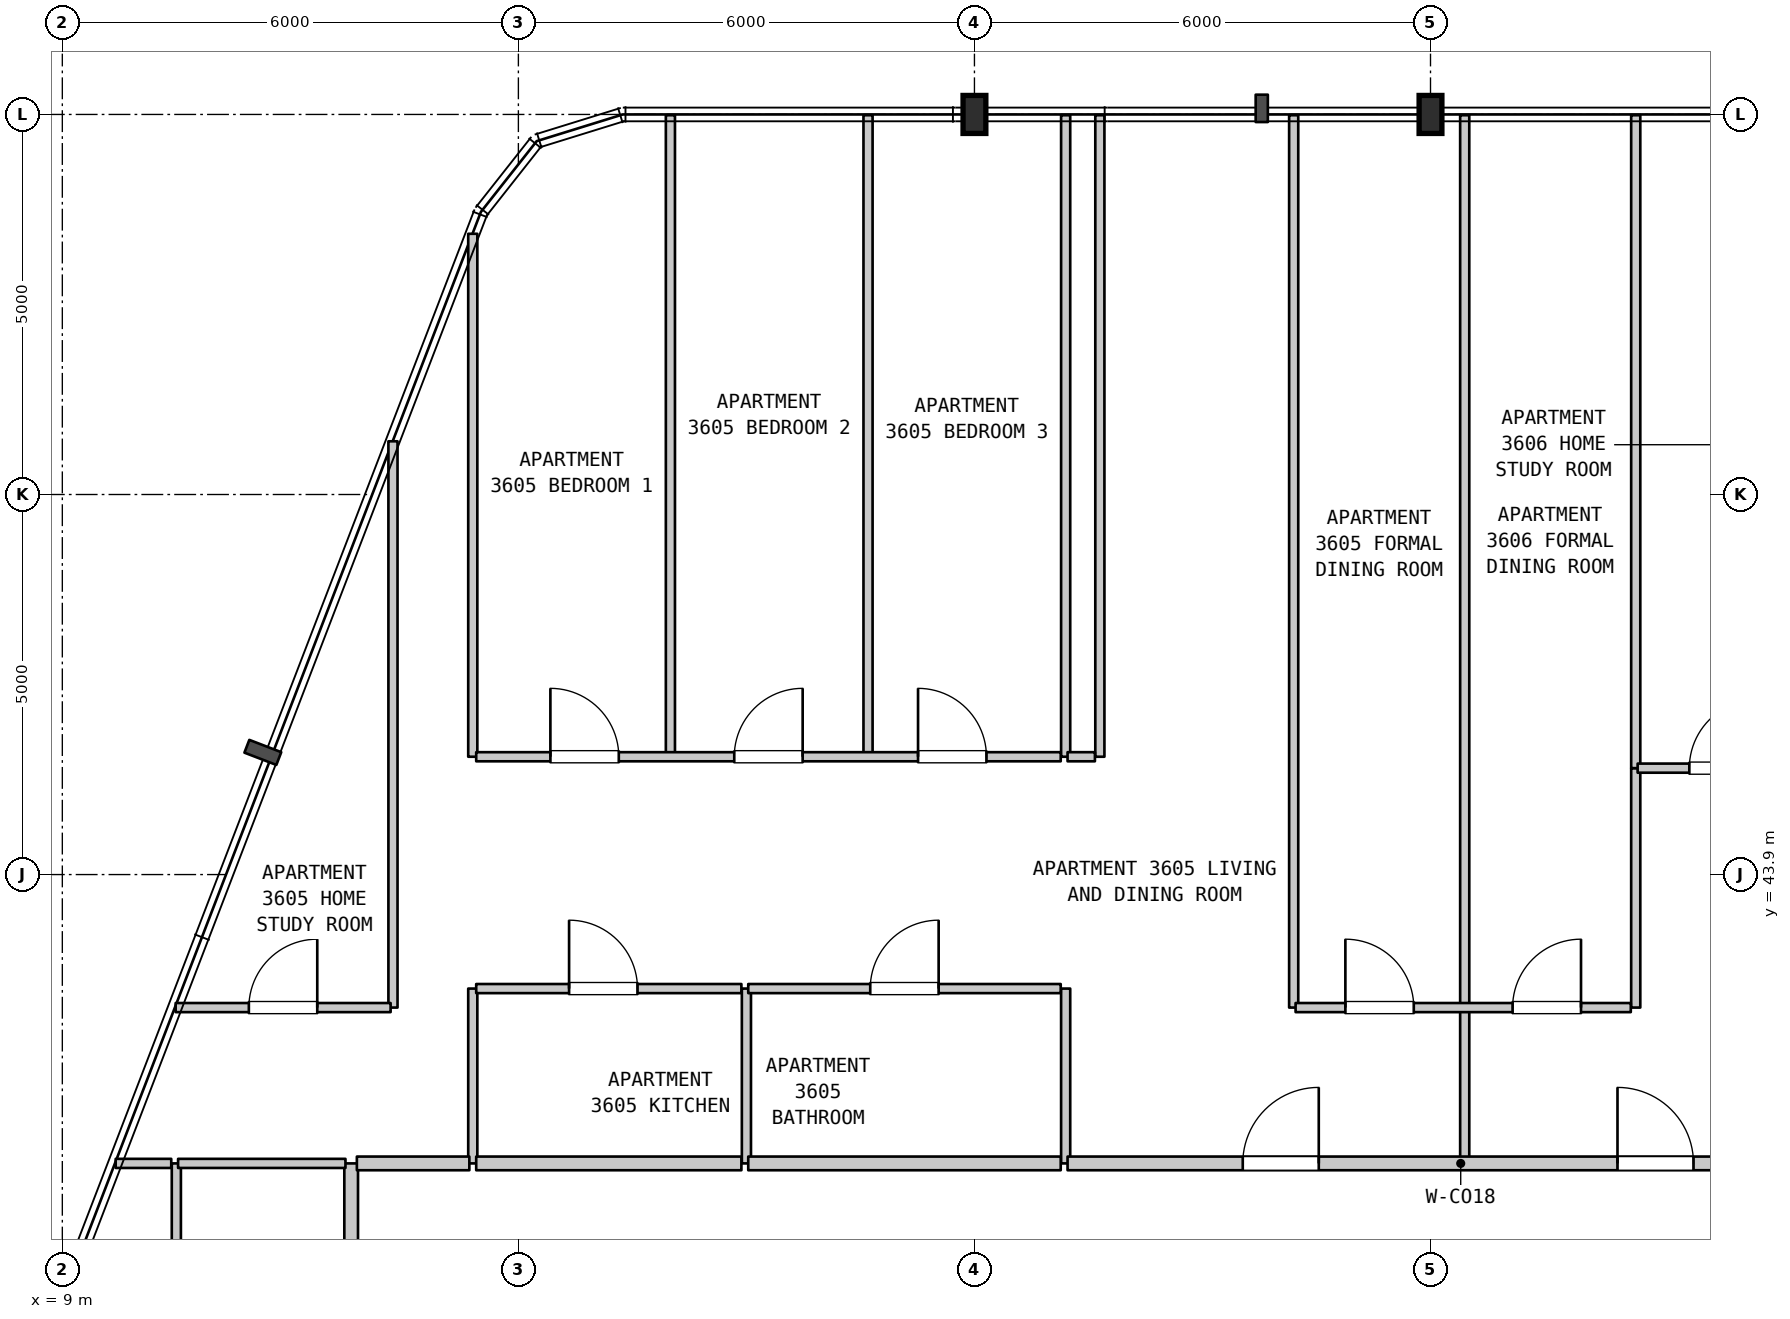
"""IFC4 building model, lengths in metres.
Left out: names, types, materials, properties, quantities, classifications, styles, units other than length and angle.
Written with IfcOpenShell. Run it as: python <this file> out.ifc"""

import sys

from ifc_helpers import new_model, si_unit, direction, frame, frame_2d, origin, origin_2d, place, context, subcontext, project, spatial, rectangle, i_section, extrude, element, fill, save


model = new_model("IFC4")
c1 = context("Model", 3, precision=1e-05, world=origin(), true_north=direction((0.0, 1.0)))
c2 = subcontext(c1, "Body", "Model", "MODEL_VIEW")
j1 = project(units=[si_unit("LENGTHUNIT", "METRE"), si_unit("PLANEANGLEUNIT", "RADIAN")], contexts=[c1])
p1 = place(None, origin())
s1 = spatial("IfcSite", under=j1, at=p1, CompositionType="ELEMENT")
p2 = place(p1, origin())
s2 = spatial("IfcBuilding", under=s1, at=p2, CompositionType="ELEMENT")
p3 = place(p2, frame((0.0, 0.0, 148.3)))
s3 = spatial("IfcBuildingStorey", under=s2, at=p3, CompositionType="ELEMENT", Elevation=148.3)
for number, where, z_axis, x_axis in (
    (1, (21.0, 53.9, 0.0), (0.0, 0.0, 1.0), (1.0, 0.0, 0.0)),
    (2, (27.0, 53.9, 0.0), (0.0, 0.0, 1.0), (1.0, 0.0, 0.0)),
):
    element("IfcColumn", number, at=place(p3, frame(where, z_axis=z_axis, x_axis=x_axis)), inside=s3, PredefinedType="COLUMN", context=c2, shape_type="SweptSolid", body=[
        extrude(i_section(OverallWidth=0.3, OverallDepth=0.5, WebThickness=0.014, FlangeThickness=0.028, FilletRadius=0.027, at=origin_2d()), origin(), (0.0, 0.0, 1.0), 3.7),
    ])
p4 = place(p3, frame((10.5, 31.09, 0.0), z_axis=(0.0, 0.0, 1.0), x_axis=(0.0, 1.0, 0.0)))
e3 = element("IfcWall", 3, at=p4, inside=s3, PredefinedType="PARTITIONING", context=c2, shape_type="SweptSolid", body=[
    extrude(rectangle(XDim=9.01, YDim=0.12, at=frame_2d((4.505, 0.0))), origin(), (0.0, 0.0, 1.0), 3.385),
])
p5 = place(p3, frame((12.8, 31.09, 0.0), z_axis=(0.0, 0.0, 1.0), x_axis=(0.0, 1.0, 0.0)))
e4 = element("IfcWall", 4, at=p5, inside=s3, PredefinedType="STANDARD", context=c2, shape_type="SweptSolid", body=[
    extrude(rectangle(XDim=9.01, YDim=0.18, at=frame_2d((4.505, 0.0))), origin(), (0.0, 0.0, 1.0), 3.385),
])
p6 = place(p3, frame((13.35, 42.15, 0.0), z_axis=(0.0, 0.0, 1.0), x_axis=(0.0, 1.0, 0.0)))
e5 = element("IfcWall", 5, at=p6, inside=s3, PredefinedType="PARTITIONING", context=c2, shape_type="SweptSolid", body=[
    extrude(rectangle(XDim=7.45, YDim=0.12, at=frame_2d((3.725, 0.0))), origin(), (0.0, 0.0, 1.0), 3.385),
])
p7 = place(p3, frame((14.4, 40.1, 0.0), z_axis=(0.0, 0.0, 1.0), x_axis=(0.0, 1.0, 0.0)))
e6 = element("IfcWall", 6, at=p7, inside=s3, PredefinedType="PARTITIONING", context=c2, shape_type="SweptSolid", body=[
    extrude(rectangle(XDim=2.3, YDim=0.12, at=frame_2d((1.15, 0.0))), origin(), (0.0, 0.0, 1.0), 3.385),
])
p8 = place(p3, frame((14.4, 45.45, 0.0), z_axis=(0.0, 0.0, 1.0), x_axis=(0.0, 1.0, 0.0)))
e7 = element("IfcWall", 7, at=p8, inside=s3, PredefinedType="PARTITIONING", context=c2, shape_type="SweptSolid", body=[
    extrude(rectangle(XDim=6.88, YDim=0.12, at=frame_2d((3.44, 0.0))), origin(), (0.0, 0.0, 1.0), 3.385),
])
p9 = place(p3, frame((17.0, 45.45, 0.0), z_axis=(0.0, 0.0, 1.0), x_axis=(0.0, 1.0, 0.0)))
e8 = element("IfcWall", 8, at=p9, inside=s3, PredefinedType="PARTITIONING", context=c2, shape_type="SweptSolid", body=[
    extrude(rectangle(XDim=8.44, YDim=0.12, at=frame_2d((4.22, 0.0))), origin(), (0.0, 0.0, 1.0), 3.385),
])
p10 = place(p3, frame((18.0, 40.1, 0.0), z_axis=(0.0, 0.0, 1.0), x_axis=(0.0, 1.0, 0.0)))
e9 = element("IfcWall", 9, at=p10, inside=s3, PredefinedType="PARTITIONING", context=c2, shape_type="SweptSolid", body=[
    extrude(rectangle(XDim=2.3, YDim=0.12, at=frame_2d((1.15, 0.0))), origin(), (0.0, 0.0, 1.0), 3.385),
])
p11 = place(p3, frame((19.6, 45.45, 0.0), z_axis=(0.0, 0.0, 1.0), x_axis=(0.0, 1.0, 0.0)))
e10 = element("IfcWall", 10, at=p11, inside=s3, PredefinedType="PARTITIONING", context=c2, shape_type="SweptSolid", body=[
    extrude(rectangle(XDim=8.44, YDim=0.12, at=frame_2d((4.22, 0.0))), origin(), (0.0, 0.0, 1.0), 3.385),
])
p12 = place(p3, frame((22.2, 40.1, 0.0), z_axis=(0.0, 0.0, 1.0), x_axis=(0.0, 1.0, 0.0)))
e11 = element("IfcWall", 11, at=p12, inside=s3, PredefinedType="PARTITIONING", context=c2, shape_type="SweptSolid", body=[
    extrude(rectangle(XDim=2.3, YDim=0.12, at=frame_2d((1.15, 0.0))), origin(), (0.0, 0.0, 1.0), 3.385),
])
for number, where, z_axis, x_axis in (
    (12, (22.2, 45.45, 0.0), (0.0, 0.0, 1.0), (0.0, 1.0, 0.0)),
    (13, (22.65, 45.45, 0.0), (0.0, 0.0, 1.0), (0.0, 1.0, 0.0)),
):
    element("IfcWall", number, at=place(p3, frame(where, z_axis=z_axis, x_axis=x_axis)), inside=s3, PredefinedType="PARTITIONING", context=c2, shape_type="SweptSolid", body=[
        extrude(rectangle(XDim=8.44, YDim=0.12, at=frame_2d((4.22, 0.0))), origin(), (0.0, 0.0, 1.0), 3.385),
    ])
p13 = place(p3, frame((25.2, 42.15, 0.0), z_axis=(0.0, 0.0, 1.0), x_axis=(0.0, 1.0, 0.0)))
e14 = element("IfcWall", 14, at=p13, inside=s3, PredefinedType="PARTITIONING", context=c2, shape_type="SweptSolid", body=[
    extrude(rectangle(XDim=11.74, YDim=0.12, at=frame_2d((5.87, 0.0))), origin(), (0.0, 0.0, 1.0), 3.385),
])
p14 = place(p3, frame((27.45, 40.1, 0.0), z_axis=(0.0, 0.0, 1.0), x_axis=(0.0, 1.0, 0.0)))
e15 = element("IfcWall", 15, at=p14, inside=s3, PredefinedType="PARTITIONING", context=c2, shape_type="SweptSolid", body=[
    extrude(rectangle(XDim=2.05, YDim=0.12, at=frame_2d((1.025, 0.0))), origin(), (0.0, 0.0, 1.0), 3.385),
])
p15 = place(p3, frame((27.45, 42.15, 0.0), z_axis=(0.0, 0.0, 1.0), x_axis=(0.0, 1.0, 0.0)))
e16 = element("IfcWall", 16, at=p15, inside=s3, PredefinedType="PARTITIONING", context=c2, shape_type="SweptSolid", body=[
    extrude(rectangle(XDim=11.74, YDim=0.12, at=frame_2d((5.87, 0.0))), origin(), (0.0, 0.0, 1.0), 3.385),
])
p16 = place(p3, frame((29.7, 42.15, 0.0), z_axis=(0.0, 0.0, 1.0), x_axis=(0.0, 1.0, 0.0)))
e17 = element("IfcWall", 17, at=p16, inside=s3, PredefinedType="PARTITIONING", context=c2, shape_type="SweptSolid", body=[
    extrude(rectangle(XDim=3.15, YDim=0.12, at=frame_2d((1.575, 0.0))), origin(), (0.0, 0.0, 1.0), 3.385),
])
p17 = place(p3, frame((29.7, 45.3, 0.0), z_axis=(0.0, 0.0, 1.0), x_axis=(0.0, 1.0, 0.0)))
e18 = element("IfcWall", 18, at=p17, inside=s3, PredefinedType="PARTITIONING", context=c2, shape_type="SweptSolid", body=[
    extrude(rectangle(XDim=8.59, YDim=0.12, at=frame_2d((4.295, 0.0))), origin(), (0.0, 0.0, 1.0), 3.385),
])
p18 = place(p3, frame((9.702, 40.1, 0.0), z_axis=(0.0, 0.0, 1.0), x_axis=(1.0, 0.0, 0.0)))
e19 = element("IfcWall", 19, at=p18, inside=s3, PredefinedType="PARTITIONING", context=c2, shape_type="SweptSolid", body=[
    extrude(rectangle(XDim=0.731, YDim=0.12, at=frame_2d((0.366, 0.0))), origin(), (0.0, 0.0, 1.0), 3.385),
])
p19 = place(p3, frame((10.523, 40.1, 0.0), z_axis=(0.0, 0.0, 1.0), x_axis=(1.0, 0.0, 0.0)))
e20 = element("IfcWall", 20, at=p19, inside=s3, PredefinedType="PARTITIONING", context=c2, shape_type="SweptSolid", body=[
    extrude(rectangle(XDim=2.202, YDim=0.12, at=frame_2d((1.101, 0.0))), origin(), (0.0, 0.0, 1.0), 3.385),
])
p20 = place(p3, frame((12.875, 40.1, 0.0), z_axis=(0.0, 0.0, 1.0), x_axis=(1.0, 0.0, 0.0)))
e21 = element("IfcWall", 21, at=p20, inside=s3, PredefinedType="STANDARD", context=c2, shape_type="SweptSolid", body=[
    extrude(rectangle(XDim=1.48, YDim=0.18, at=frame_2d((0.74, 0.0))), origin(), (0.0, 0.0, 1.0), 3.385),
])
p21 = place(p3, frame((14.445, 40.1, 0.0), z_axis=(0.0, 0.0, 1.0), x_axis=(1.0, 0.0, 0.0)))
e22 = element("IfcWall", 22, at=p21, inside=s3, PredefinedType="STANDARD", context=c2, shape_type="SweptSolid", body=[
    extrude(rectangle(XDim=3.489, YDim=0.18, at=frame_2d((1.745, 0.0))), origin(), (0.0, 0.0, 1.0), 3.385),
])
p22 = place(p3, frame((18.024, 40.1, 0.0), z_axis=(0.0, 0.0, 1.0), x_axis=(1.0, 0.0, 0.0)))
e23 = element("IfcWall", 23, at=p22, inside=s3, PredefinedType="STANDARD", context=c2, shape_type="SweptSolid", body=[
    extrude(rectangle(XDim=4.111, YDim=0.18, at=frame_2d((2.056, 0.0))), origin(), (0.0, 0.0, 1.0), 3.385),
])
p23 = place(p3, frame((22.225, 40.1, 0.0), z_axis=(0.0, 0.0, 1.0), x_axis=(1.0, 0.0, 0.0)))
e24 = element("IfcWall", 24, at=p23, inside=s3, PredefinedType="STANDARD", context=c2, shape_type="SweptSolid", body=[
    extrude(rectangle(XDim=10.345, YDim=0.18, at=frame_2d((5.172, 0.0))), origin(), (0.0, 0.0, 1.0), 3.385),
])
p24 = place(p23, frame((2.305, 0.0, 0.0)))
e25 = element("IfcOpeningElement", 25, at=p24, cuts=e24, PredefinedType="OPENING", context=c2, shape_type="SweptSolid", body=[
    extrude(rectangle(XDim=1.0, YDim=2.15, at=frame_2d((0.5, 1.075))), frame((0.0, 0.1, 0.0), z_axis=(0.0, -1.0, 0.0), x_axis=(1.0, 0.0, 0.0)), (0.0, 0.0, 1.0), 0.2),
])
p25 = place(p23, frame((7.235, 0.0, 0.0)))
e26 = element("IfcOpeningElement", 26, at=p25, cuts=e24, PredefinedType="OPENING", context=c2, shape_type="SweptSolid", body=[
    extrude(rectangle(XDim=1.0, YDim=2.15, at=frame_2d((0.5, 1.075))), frame((0.0, 0.1, 0.0), z_axis=(0.0, -1.0, 0.0), x_axis=(1.0, 0.0, 0.0)), (0.0, 0.0, 1.0), 0.2),
])
p26 = place(p3, frame((10.491, 42.15, 0.0), z_axis=(0.0, 0.0, 1.0), x_axis=(1.0, 0.0, 0.0)))
e27 = element("IfcWall", 27, at=p26, inside=s3, PredefinedType="PARTITIONING", context=c2, shape_type="SweptSolid", body=[
    extrude(rectangle(XDim=2.828, YDim=0.12, at=frame_2d((1.414, 0.0))), origin(), (0.0, 0.0, 1.0), 3.385),
])
p27 = place(p26, frame((0.963, 0.0, 0.0)))
e28 = element("IfcOpeningElement", 28, at=p27, cuts=e27, PredefinedType="OPENING", context=c2, shape_type="SweptSolid", body=[
    extrude(rectangle(XDim=0.9, YDim=2.15, at=frame_2d((0.45, 1.075))), frame((0.0, 0.07, 0.0), z_axis=(0.0, -1.0, 0.0), x_axis=(1.0, 0.0, 0.0)), (0.0, 0.0, 1.0), 0.14),
])
p28 = place(p3, frame((25.225, 42.15, 0.0), z_axis=(0.0, 0.0, 1.0), x_axis=(1.0, 0.0, 0.0)))
e29 = element("IfcWall", 29, at=p28, inside=s3, PredefinedType="PARTITIONING", context=c2, shape_type="SweptSolid", body=[
    extrude(rectangle(XDim=4.41, YDim=0.12, at=frame_2d((2.205, 0.0))), origin(), (0.0, 0.0, 1.0), 3.385),
])
p29 = place(p28, frame((0.655, 0.0, 0.0)))
e30 = element("IfcOpeningElement", 30, at=p29, cuts=e29, PredefinedType="OPENING", context=c2, shape_type="SweptSolid", body=[
    extrude(rectangle(XDim=0.9, YDim=2.15, at=frame_2d((0.45, 1.075))), frame((0.0, 0.07, 0.0), z_axis=(0.0, -1.0, 0.0), x_axis=(1.0, 0.0, 0.0)), (0.0, 0.0, 1.0), 0.14),
])
p30 = place(p28, frame((2.855, 0.0, 0.0)))
e31 = element("IfcOpeningElement", 31, at=p30, cuts=e29, PredefinedType="OPENING", context=c2, shape_type="SweptSolid", body=[
    extrude(rectangle(XDim=0.9, YDim=2.15, at=frame_2d((0.45, 1.075))), frame((0.0, 0.07, 0.0), z_axis=(0.0, -1.0, 0.0), x_axis=(1.0, 0.0, 0.0)), (0.0, 0.0, 1.0), 0.14),
])
p31 = place(p3, frame((14.445, 42.4, 0.0), z_axis=(0.0, 0.0, 1.0), x_axis=(1.0, 0.0, 0.0)))
e32 = element("IfcWall", 32, at=p31, inside=s3, PredefinedType="PARTITIONING", context=c2, shape_type="SweptSolid", body=[
    extrude(rectangle(XDim=3.489, YDim=0.12, at=frame_2d((1.745, 0.0))), origin(), (0.0, 0.0, 1.0), 3.385),
])
p32 = place(p31, frame((1.222, 0.0, 0.0)))
e33 = element("IfcOpeningElement", 33, at=p32, cuts=e32, PredefinedType="OPENING", context=c2, shape_type="SweptSolid", body=[
    extrude(rectangle(XDim=0.9, YDim=2.15, at=frame_2d((0.45, 1.075))), frame((0.0, 0.07, 0.0), z_axis=(0.0, -1.0, 0.0), x_axis=(1.0, 0.0, 0.0)), (0.0, 0.0, 1.0), 0.14),
])
p33 = place(p3, frame((18.024, 42.4, 0.0), z_axis=(0.0, 0.0, 1.0), x_axis=(1.0, 0.0, 0.0)))
e34 = element("IfcWall", 34, at=p33, inside=s3, PredefinedType="PARTITIONING", context=c2, shape_type="SweptSolid", body=[
    extrude(rectangle(XDim=4.111, YDim=0.12, at=frame_2d((2.056, 0.0))), origin(), (0.0, 0.0, 1.0), 3.385),
])
p34 = place(p33, frame((1.605, 0.0, 0.0)))
e35 = element("IfcOpeningElement", 35, at=p34, cuts=e34, PredefinedType="OPENING", context=c2, shape_type="SweptSolid", body=[
    extrude(rectangle(XDim=0.9, YDim=2.1, at=frame_2d((0.45, 1.05))), frame((0.0, 0.07, 0.0), z_axis=(0.0, -1.0, 0.0), x_axis=(1.0, 0.0, 0.0)), (0.0, 0.0, 1.0), 0.14),
])
p35 = place(p3, frame((29.725, 45.3, 0.0), z_axis=(0.0, 0.0, 1.0), x_axis=(1.0, 0.0, 0.0)))
e36 = element("IfcWall", 36, at=p35, inside=s3, PredefinedType="PARTITIONING", context=c2, shape_type="SweptSolid", body=[
    extrude(rectangle(XDim=2.26, YDim=0.12, at=frame_2d((1.13, 0.0))), origin(), (0.0, 0.0, 1.0), 3.385),
])
p36 = place(p35, frame((0.68, 0.0, 0.0)))
e37 = element("IfcOpeningElement", 37, at=p36, cuts=e36, PredefinedType="OPENING", context=c2, shape_type="SweptSolid", body=[
    extrude(rectangle(XDim=0.9, YDim=2.15, at=frame_2d((0.45, 1.075))), frame((0.0, 0.07, 0.0), z_axis=(0.0, -1.0, 0.0), x_axis=(1.0, 0.0, 0.0)), (0.0, 0.0, 1.0), 0.14),
])
p37 = place(p3, frame((14.445, 45.45, 0.0), z_axis=(0.0, 0.0, 1.0), x_axis=(1.0, 0.0, 0.0)))
e38 = element("IfcWall", 38, at=p37, inside=s3, PredefinedType="PARTITIONING", context=c2, shape_type="SweptSolid", body=[
    extrude(rectangle(XDim=7.69, YDim=0.12, at=frame_2d((3.845, 0.0))), origin(), (0.0, 0.0, 1.0), 3.385),
])
p38 = place(p37, frame((0.976, 0.0, 0.0)))
e39 = element("IfcOpeningElement", 39, at=p38, cuts=e38, PredefinedType="OPENING", context=c2, shape_type="SweptSolid", body=[
    extrude(rectangle(XDim=0.9, YDim=2.15, at=frame_2d((0.45, 1.075))), frame((0.0, 0.07, 0.0), z_axis=(0.0, -1.0, 0.0), x_axis=(1.0, 0.0, 0.0)), (0.0, 0.0, 1.0), 0.14),
])
p39 = place(p37, frame((3.395, 0.0, 0.0)))
e40 = element("IfcOpeningElement", 40, at=p39, cuts=e38, PredefinedType="OPENING", context=c2, shape_type="SweptSolid", body=[
    extrude(rectangle(XDim=0.9, YDim=2.15, at=frame_2d((0.45, 1.075))), frame((0.0, 0.07, 0.0), z_axis=(0.0, -1.0, 0.0), x_axis=(1.0, 0.0, 0.0)), (0.0, 0.0, 1.0), 0.14),
])
p40 = place(p37, frame((5.813, 0.0, 0.0)))
e41 = element("IfcOpeningElement", 41, at=p40, cuts=e38, PredefinedType="OPENING", context=c2, shape_type="SweptSolid", body=[
    extrude(rectangle(XDim=0.9, YDim=2.15, at=frame_2d((0.45, 1.075))), frame((0.0, 0.07, 0.0), z_axis=(0.0, -1.0, 0.0), x_axis=(1.0, 0.0, 0.0)), (0.0, 0.0, 1.0), 0.14),
])
p41 = place(p3, frame((22.225, 45.45, 0.0), z_axis=(0.0, 0.0, 1.0), x_axis=(1.0, 0.0, 0.0)))
e42 = element("IfcWall", 42, at=p41, inside=s3, PredefinedType="PARTITIONING", context=c2, shape_type="SweptSolid", body=[
    extrude(rectangle(XDim=0.36, YDim=0.12, at=frame_2d((0.18, 0.0))), origin(), (0.0, 0.0, 1.0), 3.385),
])
p42 = place(p24, origin())
e43 = element("IfcDoor", 43, at=p42, inside=s3, OperationType="SINGLE_SWING_RIGHT", PredefinedType="DOOR", context=c2, shape_type="SweptSolid", body=[
    extrude(rectangle(XDim=1.0, YDim=2.15, at=frame_2d((0.5, 1.075))), frame((0.0, 0.025, 0.0), z_axis=(0.0, -1.0, 0.0), x_axis=(1.0, 0.0, 0.0)), (0.0, 0.0, 1.0), 0.05),
])
fill(e25, e43)
p43 = place(p25, origin())
e44 = element("IfcDoor", 44, at=p43, inside=s3, OperationType="SINGLE_SWING_LEFT", PredefinedType="DOOR", context=c2, shape_type="SweptSolid", body=[
    extrude(rectangle(XDim=1.0, YDim=2.15, at=frame_2d((0.5, 1.075))), frame((0.0, 0.025, 0.0), z_axis=(0.0, -1.0, 0.0), x_axis=(1.0, 0.0, 0.0)), (0.0, 0.0, 1.0), 0.05),
])
fill(e26, e44)
p44 = place(p27, origin())
e45 = element("IfcDoor", 45, at=p44, inside=s3, OperationType="SINGLE_SWING_RIGHT", PredefinedType="DOOR", context=c2, shape_type="SweptSolid", body=[
    extrude(rectangle(XDim=0.9, YDim=2.15, at=frame_2d((0.45, 1.075))), frame((0.0, 0.025, 0.0), z_axis=(0.0, -1.0, 0.0), x_axis=(1.0, 0.0, 0.0)), (0.0, 0.0, 1.0), 0.05),
])
fill(e28, e45)
p45 = place(p29, origin())
e46 = element("IfcDoor", 46, at=p45, inside=s3, OperationType="SINGLE_SWING_LEFT", PredefinedType="DOOR", context=c2, shape_type="SweptSolid", body=[
    extrude(rectangle(XDim=0.9, YDim=2.15, at=frame_2d((0.45, 1.075))), frame((0.0, 0.025, 0.0), z_axis=(0.0, -1.0, 0.0), x_axis=(1.0, 0.0, 0.0)), (0.0, 0.0, 1.0), 0.05),
])
fill(e30, e46)
p46 = place(p30, origin())
e47 = element("IfcDoor", 47, at=p46, inside=s3, OperationType="SINGLE_SWING_RIGHT", PredefinedType="DOOR", context=c2, shape_type="SweptSolid", body=[
    extrude(rectangle(XDim=0.9, YDim=2.15, at=frame_2d((0.45, 1.075))), frame((0.0, 0.025, 0.0), z_axis=(0.0, -1.0, 0.0), x_axis=(1.0, 0.0, 0.0)), (0.0, 0.0, 1.0), 0.05),
])
fill(e31, e47)
p47 = place(p32, origin())
e48 = element("IfcDoor", 48, at=p47, inside=s3, OperationType="SINGLE_SWING_LEFT", PredefinedType="DOOR", context=c2, shape_type="SweptSolid", body=[
    extrude(rectangle(XDim=0.9, YDim=2.15, at=frame_2d((0.45, 1.075))), frame((0.0, 0.025, 0.0), z_axis=(0.0, -1.0, 0.0), x_axis=(1.0, 0.0, 0.0)), (0.0, 0.0, 1.0), 0.05),
])
fill(e33, e48)
p48 = place(p34, origin())
e49 = element("IfcDoor", 49, at=p48, inside=s3, OperationType="SINGLE_SWING_RIGHT", PredefinedType="DOOR", context=c2, shape_type="SweptSolid", body=[
    extrude(rectangle(XDim=0.9, YDim=2.1, at=frame_2d((0.45, 1.05))), frame((0.0, 0.025, 0.0), z_axis=(0.0, -1.0, 0.0), x_axis=(1.0, 0.0, 0.0)), (0.0, 0.0, 1.0), 0.05),
])
fill(e35, e49)
p49 = place(p36, origin())
e50 = element("IfcDoor", 50, at=p49, inside=s3, OperationType="SINGLE_SWING_RIGHT", PredefinedType="DOOR", context=c2, shape_type="SweptSolid", body=[
    extrude(rectangle(XDim=0.9, YDim=2.15, at=frame_2d((0.45, 1.075))), frame((0.0, 0.025, 0.0), z_axis=(0.0, -1.0, 0.0), x_axis=(1.0, 0.0, 0.0)), (0.0, 0.0, 1.0), 0.05),
])
fill(e37, e50)
p50 = place(p38, origin())
e51 = element("IfcDoor", 51, at=p50, inside=s3, OperationType="SINGLE_SWING_LEFT", PredefinedType="DOOR", context=c2, shape_type="SweptSolid", body=[
    extrude(rectangle(XDim=0.9, YDim=2.15, at=frame_2d((0.45, 1.075))), frame((0.0, 0.025, 0.0), z_axis=(0.0, -1.0, 0.0), x_axis=(1.0, 0.0, 0.0)), (0.0, 0.0, 1.0), 0.05),
])
fill(e39, e51)
p51 = place(p39, origin())
e52 = element("IfcDoor", 52, at=p51, inside=s3, OperationType="SINGLE_SWING_RIGHT", PredefinedType="DOOR", context=c2, shape_type="SweptSolid", body=[
    extrude(rectangle(XDim=0.9, YDim=2.15, at=frame_2d((0.45, 1.075))), frame((0.0, 0.025, 0.0), z_axis=(0.0, -1.0, 0.0), x_axis=(1.0, 0.0, 0.0)), (0.0, 0.0, 1.0), 0.05),
])
fill(e40, e52)
p52 = place(p40, origin())
e53 = element("IfcDoor", 53, at=p52, inside=s3, OperationType="SINGLE_SWING_LEFT", PredefinedType="DOOR", context=c2, shape_type="SweptSolid", body=[
    extrude(rectangle(XDim=0.9, YDim=2.15, at=frame_2d((0.45, 1.075))), frame((0.0, 0.025, 0.0), z_axis=(0.0, -1.0, 0.0), x_axis=(1.0, 0.0, 0.0)), (0.0, 0.0, 1.0), 0.05),
])
fill(e41, e53)
save(model, sys.argv[1])
